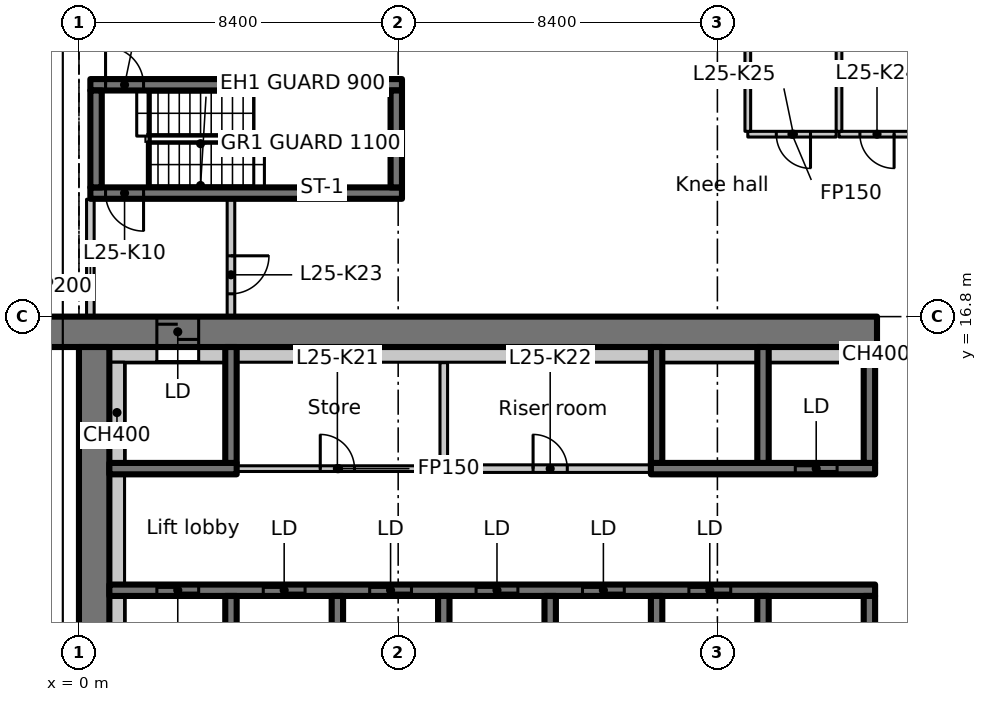
"""IFC4 building model, lengths in metres.
Left out: names, types, materials, properties, quantities, classifications, styles, units other than length and angle.
Written with IfcOpenShell. Run it as: python <this file> out.ifc"""

import sys

from ifc_helpers import new_model, si_unit, direction, frame, frame_2d, origin, place, context, subcontext, project, spatial, rectangle, extrude, element, fill, save


model = new_model("IFC4")
c1 = context("Model", 3, precision=1e-05, world=origin(), true_north=direction((0.0, 1.0)))
c2 = subcontext(c1, "Body", "Model", "MODEL_VIEW")
j1 = project(units=[si_unit("LENGTHUNIT", "METRE"), si_unit("PLANEANGLEUNIT", "RADIAN")], contexts=[c1])
p1 = place(None, origin())
s1 = spatial("IfcSite", under=j1, at=p1, CompositionType="ELEMENT")
p2 = place(p1, origin())
s2 = spatial("IfcBuilding", under=s1, at=p2, CompositionType="ELEMENT")
p3 = place(p2, frame((0.0, 0.0, 106.1)))
s3 = spatial("IfcBuildingStorey", under=s2, at=p3, CompositionType="ELEMENT", Elevation=106.1)
p4 = place(p3, frame((-1.1, 16.4, 0.0), z_axis=(0.0, 0.0, 1.0), x_axis=(1.0, 0.0, 0.0)))
e1 = element("IfcWall", 1, at=p4, inside=s3, PredefinedType="SHEAR", context=c2, shape_type="SweptSolid", body=[
    extrude(rectangle(XDim=22.1, YDim=0.8, at=frame_2d((11.05, 0.0))), origin(), (0.0, 0.0, 1.0), 3.35),
])
p5 = place(p4, frame((3.15, 0.0, 0.0)))
e2 = element("IfcOpeningElement", 2, at=p5, cuts=e1, PredefinedType="OPENING", context=c2, shape_type="SweptSolid", body=[
    extrude(rectangle(XDim=1.1, YDim=2.3, at=frame_2d((0.55, 1.15))), frame((0.0, 0.41, 0.0), z_axis=(0.0, -1.0, 0.0), x_axis=(1.0, 0.0, 0.0)), (0.0, 0.0, 1.0), 0.82),
])
p6 = place(p3, frame((0.4, 7.136, 0.0), z_axis=(0.0, 0.0, 1.0), x_axis=(0.0, 1.0, 0.0)))
e3 = element("IfcWall", 3, at=p6, inside=s3, PredefinedType="SHEAR", context=c2, shape_type="SweptSolid", body=[
    extrude(rectangle(XDim=8.864, YDim=0.8, at=frame_2d((4.432, 0.0))), origin(), (0.0, 0.0, 1.0), 3.35),
])
p7 = place(p3, frame((0.8, 15.8, 0.0), z_axis=(0.0, 0.0, 1.0), x_axis=(1.0, 0.0, 0.0)))
e4 = element("IfcWall", 4, at=p7, inside=s3, PredefinedType="PARTITIONING", context=c2, shape_type="SweptSolid", body=[
    extrude(rectangle(XDim=1.25, YDim=0.4, at=frame_2d((0.625, 0.0))), origin(), (0.0, 0.0, 1.0), 3.35),
])
p8 = place(p3, frame((0.8, 9.6, 0.0), z_axis=(0.0, 0.0, 1.0), x_axis=(1.0, 0.0, 0.0)))
e5 = element("IfcWall", 5, at=p8, inside=s3, PredefinedType="SHEAR", context=c2, shape_type="SweptSolid", body=[
    extrude(rectangle(XDim=20.15, YDim=0.3, at=frame_2d((10.075, 0.0))), origin(), (0.0, 0.0, 1.0), 3.35),
])
p9 = place(p8, frame((1.25, 0.0, 0.0)))
e6 = element("IfcOpeningElement", 6, at=p9, cuts=e5, PredefinedType="OPENING", context=c2, shape_type="SweptSolid", body=[
    extrude(rectangle(XDim=1.1, YDim=2.3, at=frame_2d((0.55, 1.15))), frame((0.0, 0.16, 0.0), z_axis=(0.0, -1.0, 0.0), x_axis=(1.0, 0.0, 0.0)), (0.0, 0.0, 1.0), 0.32),
])
p10 = place(p8, frame((4.05, 0.0, 0.0)))
e7 = element("IfcOpeningElement", 7, at=p10, cuts=e5, PredefinedType="OPENING", context=c2, shape_type="SweptSolid", body=[
    extrude(rectangle(XDim=1.1, YDim=2.3, at=frame_2d((0.55, 1.15))), frame((0.0, 0.16, 0.0), z_axis=(0.0, -1.0, 0.0), x_axis=(1.0, 0.0, 0.0)), (0.0, 0.0, 1.0), 0.32),
])
p11 = place(p8, frame((6.85, 0.0, 0.0)))
e8 = element("IfcOpeningElement", 8, at=p11, cuts=e5, PredefinedType="OPENING", context=c2, shape_type="SweptSolid", body=[
    extrude(rectangle(XDim=1.1, YDim=2.3, at=frame_2d((0.55, 1.15))), frame((0.0, 0.16, 0.0), z_axis=(0.0, -1.0, 0.0), x_axis=(1.0, 0.0, 0.0)), (0.0, 0.0, 1.0), 0.32),
])
p12 = place(p8, frame((9.65, 0.0, 0.0)))
e9 = element("IfcOpeningElement", 9, at=p12, cuts=e5, PredefinedType="OPENING", context=c2, shape_type="SweptSolid", body=[
    extrude(rectangle(XDim=1.1, YDim=2.3, at=frame_2d((0.55, 1.15))), frame((0.0, 0.16, 0.0), z_axis=(0.0, -1.0, 0.0), x_axis=(1.0, 0.0, 0.0)), (0.0, 0.0, 1.0), 0.32),
])
p13 = place(p8, frame((12.45, 0.0, 0.0)))
e10 = element("IfcOpeningElement", 10, at=p13, cuts=e5, PredefinedType="OPENING", context=c2, shape_type="SweptSolid", body=[
    extrude(rectangle(XDim=1.1, YDim=2.3, at=frame_2d((0.55, 1.15))), frame((0.0, 0.16, 0.0), z_axis=(0.0, -1.0, 0.0), x_axis=(1.0, 0.0, 0.0)), (0.0, 0.0, 1.0), 0.32),
])
p14 = place(p8, frame((15.25, 0.0, 0.0)))
e11 = element("IfcOpeningElement", 11, at=p14, cuts=e5, PredefinedType="OPENING", context=c2, shape_type="SweptSolid", body=[
    extrude(rectangle(XDim=1.1, YDim=2.3, at=frame_2d((0.55, 1.15))), frame((0.0, 0.16, 0.0), z_axis=(0.0, -1.0, 0.0), x_axis=(1.0, 0.0, 0.0)), (0.0, 0.0, 1.0), 0.32),
])
for number, where, z_axis, x_axis in (
    (12, (4.0, 7.15, 0.0), (0.0, 0.0, 1.0), (0.0, 1.0, 0.0)),
    (13, (6.8, 7.15, 0.0), (0.0, 0.0, 1.0), (0.0, 1.0, 0.0)),
    (14, (9.6, 7.15, 0.0), (0.0, 0.0, 1.0), (0.0, 1.0, 0.0)),
    (15, (12.4, 7.15, 0.0), (0.0, 0.0, 1.0), (0.0, 1.0, 0.0)),
    (16, (15.2, 7.15, 0.0), (0.0, 0.0, 1.0), (0.0, 1.0, 0.0)),
    (17, (18.0, 7.15, 0.0), (0.0, 0.0, 1.0), (0.0, 1.0, 0.0)),
    (18, (20.8, 7.15, 0.0), (0.0, 0.0, 1.0), (0.0, 1.0, 0.0)),
):
    element("IfcWall", number, at=place(p3, frame(where, z_axis=z_axis, x_axis=x_axis)), inside=s3, PredefinedType="SHEAR", context=c2, shape_type="SweptSolid", body=[
        extrude(rectangle(XDim=2.3, YDim=0.3, at=frame_2d((1.15, 0.0))), origin(), (0.0, 0.0, 1.0), 3.35),
    ])
p15 = place(p3, frame((0.8, 12.8, 0.0), z_axis=(0.0, 0.0, 1.0), x_axis=(1.0, 0.0, 0.0)))
e19 = element("IfcWall", 19, at=p15, inside=s3, PredefinedType="SHEAR", context=c2, shape_type="SweptSolid", body=[
    extrude(rectangle(XDim=3.35, YDim=0.3, at=frame_2d((1.675, 0.0))), origin(), (0.0, 0.0, 1.0), 3.35),
])
p16 = place(p3, frame((4.0, 12.95, 0.0), z_axis=(0.0, 0.0, 1.0), x_axis=(0.0, 1.0, 0.0)))
e20 = element("IfcWall", 20, at=p16, inside=s3, PredefinedType="SHEAR", context=c2, shape_type="SweptSolid", body=[
    extrude(rectangle(XDim=3.05, YDim=0.3, at=frame_2d((1.525, 0.0))), origin(), (0.0, 0.0, 1.0), 3.35),
])
p17 = place(p3, frame((15.05, 12.8, 0.0), z_axis=(0.0, 0.0, 1.0), x_axis=(1.0, 0.0, 0.0)))
e21 = element("IfcWall", 21, at=p17, inside=s3, PredefinedType="SHEAR", context=c2, shape_type="SweptSolid", body=[
    extrude(rectangle(XDim=5.9, YDim=0.3, at=frame_2d((2.95, 0.0))), origin(), (0.0, 0.0, 1.0), 3.35),
])
p18 = place(p17, frame((3.8, 0.0, 0.0)))
e22 = element("IfcOpeningElement", 22, at=p18, cuts=e21, PredefinedType="OPENING", context=c2, shape_type="SweptSolid", body=[
    extrude(rectangle(XDim=1.1, YDim=2.3, at=frame_2d((0.55, 1.15))), frame((0.0, 0.16, 0.0), z_axis=(0.0, -1.0, 0.0), x_axis=(1.0, 0.0, 0.0)), (0.0, 0.0, 1.0), 0.32),
])
for number, where, z_axis, x_axis in (
    (23, (15.2, 12.95, 0.0), (0.0, 0.0, 1.0), (0.0, 1.0, 0.0)),
    (24, (18.0, 12.95, 0.0), (0.0, 0.0, 1.0), (0.0, 1.0, 0.0)),
    (25, (20.8, 12.95, 0.0), (0.0, 0.0, 1.0), (0.0, 1.0, 0.0)),
):
    element("IfcWall", number, at=place(p3, frame(where, z_axis=z_axis, x_axis=x_axis)), inside=s3, PredefinedType="SHEAR", context=c2, shape_type="SweptSolid", body=[
        extrude(rectangle(XDim=3.05, YDim=0.3, at=frame_2d((1.525, 0.0))), origin(), (0.0, 0.0, 1.0), 3.35),
    ])
p19 = place(p3, frame((8.5, 20.05, 0.0), z_axis=(0.0, 0.0, 1.0), x_axis=(-1.0, 0.0, 0.0)))
e26 = element("IfcWall", 26, at=p19, inside=s3, PredefinedType="SHEAR", context=c2, shape_type="SweptSolid", body=[
    extrude(rectangle(XDim=8.2, YDim=0.3, at=frame_2d((4.1, 0.0))), origin(), (0.0, 0.0, 1.0), 3.35),
])
p20 = place(p19, frame((6.8, 0.0, 0.0)))
e27 = element("IfcOpeningElement", 27, at=p20, cuts=e26, PredefinedType="OPENING", context=c2, shape_type="SweptSolid", body=[
    extrude(rectangle(XDim=1.0, YDim=2.1, at=frame_2d((0.5, 1.05))), frame((0.0, 0.16, 0.0), z_axis=(0.0, -1.0, 0.0), x_axis=(1.0, 0.0, 0.0)), (0.0, 0.0, 1.0), 0.32),
])
p21 = place(p3, frame((0.3, 22.9, 0.0), z_axis=(0.0, 0.0, 1.0), x_axis=(1.0, 0.0, 0.0)))
e28 = element("IfcWall", 28, at=p21, inside=s3, PredefinedType="SHEAR", context=c2, shape_type="SweptSolid", body=[
    extrude(rectangle(XDim=8.2, YDim=0.3, at=frame_2d((4.1, 0.0))), origin(), (0.0, 0.0, 1.0), 3.35),
])
p22 = place(p21, frame((0.4, 0.0, 0.0)))
e29 = element("IfcOpeningElement", 29, at=p22, cuts=e28, PredefinedType="OPENING", context=c2, shape_type="SweptSolid", body=[
    extrude(rectangle(XDim=1.0, YDim=2.1, at=frame_2d((0.5, 1.05))), frame((0.0, 0.16, 0.0), z_axis=(0.0, -1.0, 0.0), x_axis=(1.0, 0.0, 0.0)), (0.0, 0.0, 1.0), 0.32),
])
for number, where, z_axis, x_axis in (
    (30, (0.45, 20.2, 0.0), (0.0, 0.0, 1.0), (0.0, 1.0, 0.0)),
    (31, (8.35, 20.2, 0.0), (0.0, 0.0, 1.0), (0.0, 1.0, 0.0)),
):
    element("IfcWall", number, at=place(p3, frame(where, z_axis=z_axis, x_axis=x_axis)), inside=s3, PredefinedType="SHEAR", context=c2, shape_type="SweptSolid", body=[
        extrude(rectangle(XDim=2.55, YDim=0.3, at=frame_2d((1.275, 0.0))), origin(), (0.0, 0.0, 1.0), 3.35),
    ])
p23 = place(p3, frame((0.3, 16.812, 0.0), z_axis=(0.0, 0.0, 1.0), x_axis=(0.0, 1.0, 0.0)))
e32 = element("IfcWall", 32, at=p23, inside=s3, PredefinedType="PARTITIONING", context=c2, shape_type="SweptSolid", body=[
    extrude(rectangle(XDim=3.076, YDim=0.2, at=frame_2d((1.538, 0.0))), origin(), (0.0, 0.0, 1.0), 2.98),
])
p24 = place(p3, frame((4.0, 19.888, 0.0), z_axis=(0.0, 0.0, 1.0), x_axis=(0.0, -1.0, 0.0)))
e33 = element("IfcWall", 33, at=p24, inside=s3, PredefinedType="PARTITIONING", context=c2, shape_type="SweptSolid", body=[
    extrude(rectangle(XDim=3.076, YDim=0.2, at=frame_2d((1.538, 0.0))), origin(), (0.0, 0.0, 1.0), 3.35),
])
p25 = place(p24, frame((1.488, 0.0, 0.0)))
e34 = element("IfcOpeningElement", 34, at=p25, cuts=e33, PredefinedType="OPENING", context=c2, shape_type="SweptSolid", body=[
    extrude(rectangle(XDim=1.0, YDim=2.1, at=frame_2d((0.5, 1.05))), frame((0.0, 0.11, 0.0), z_axis=(0.0, -1.0, 0.0), x_axis=(1.0, 0.0, 0.0)), (0.0, 0.0, 1.0), 0.22),
])
p26 = place(p3, frame((9.6, 15.588, 0.0), z_axis=(0.0, 0.0, 1.0), x_axis=(0.0, -1.0, 0.0)))
e35 = element("IfcWall", 35, at=p26, inside=s3, PredefinedType="PARTITIONING", context=c2, shape_type="SweptSolid", body=[
    extrude(rectangle(XDim=2.788, YDim=0.2, at=frame_2d((1.394, 0.0))), origin(), (0.0, 0.0, 1.0), 3.35),
])
p27 = place(p3, frame((9.7, 12.8, 0.0), z_axis=(0.0, 0.0, 1.0), x_axis=(1.0, 0.0, 0.0)))
e36 = element("IfcWall", 36, at=p27, inside=s3, PredefinedType="PARTITIONING", context=c2, shape_type="SweptSolid", body=[
    extrude(rectangle(XDim=5.338, YDim=0.2, at=frame_2d((2.669, 0.0))), origin(), (0.0, 0.0, 1.0), 3.35),
])
p28 = place(p27, frame((2.25, 0.0, 0.0)))
e37 = element("IfcOpeningElement", 37, at=p28, cuts=e36, PredefinedType="OPENING", context=c2, shape_type="SweptSolid", body=[
    extrude(rectangle(XDim=0.9, YDim=2.1, at=frame_2d((0.45, 1.05))), frame((0.0, 0.11, 0.0), z_axis=(0.0, -1.0, 0.0), x_axis=(1.0, 0.0, 0.0)), (0.0, 0.0, 1.0), 0.22),
])
p29 = place(p3, frame((4.162, 12.8, 0.0), z_axis=(0.0, 0.0, 1.0), x_axis=(1.0, 0.0, 0.0)))
e38 = element("IfcWall", 38, at=p29, inside=s3, PredefinedType="PARTITIONING", context=c2, shape_type="SweptSolid", body=[
    extrude(rectangle(XDim=5.338, YDim=0.15, at=frame_2d((2.669, 0.0))), origin(), (0.0, 0.0, 1.0), 3.35),
])
p30 = place(p29, frame((2.188, 0.0, 0.0)))
e39 = element("IfcOpeningElement", 39, at=p30, cuts=e38, PredefinedType="OPENING", context=c2, shape_type="SweptSolid", body=[
    extrude(rectangle(XDim=0.9, YDim=2.1, at=frame_2d((0.45, 1.05))), frame((0.0, 0.085, 0.0), z_axis=(0.0, -1.0, 0.0), x_axis=(1.0, 0.0, 0.0)), (0.0, 0.0, 1.0), 0.17),
])
p31 = place(p3, frame((21.925, 21.6, 0.0), z_axis=(0.0, 0.0, 1.0), x_axis=(-1.0, 0.0, 0.0)))
e40 = element("IfcWall", 40, at=p31, inside=s3, PredefinedType="PARTITIONING", context=c2, shape_type="SweptSolid", body=[
    extrude(rectangle(XDim=1.925, YDim=0.15, at=frame_2d((0.962, 0.0))), origin(), (0.0, 0.0, 1.0), 3.35),
])
p32 = place(p31, frame((0.475, 0.0, 0.0)))
e41 = element("IfcOpeningElement", 41, at=p32, cuts=e40, PredefinedType="OPENING", context=c2, shape_type="SweptSolid", body=[
    extrude(rectangle(XDim=0.9, YDim=2.1, at=frame_2d((0.45, 1.05))), frame((0.0, 0.085, 0.0), z_axis=(0.0, -1.0, 0.0), x_axis=(1.0, 0.0, 0.0)), (0.0, 0.0, 1.0), 0.17),
])
p33 = place(p3, frame((20.0, 21.675, 0.0), z_axis=(0.0, 0.0, 1.0), x_axis=(0.0, 1.0, 0.0)))
e42 = element("IfcWall", 42, at=p33, inside=s3, PredefinedType="PARTITIONING", context=c2, shape_type="SweptSolid", body=[
    extrude(rectangle(XDim=2.25, YDim=0.15, at=frame_2d((1.125, 0.0))), origin(), (0.0, 0.0, 1.0), 3.35),
])
p34 = place(p3, frame((19.925, 21.6, 0.0), z_axis=(0.0, 0.0, 1.0), x_axis=(-1.0, 0.0, 0.0)))
e43 = element("IfcWall", 43, at=p34, inside=s3, PredefinedType="PARTITIONING", context=c2, shape_type="SweptSolid", body=[
    extrude(rectangle(XDim=2.325, YDim=0.15, at=frame_2d((1.163, 0.0))), origin(), (0.0, 0.0, 1.0), 3.35),
])
p35 = place(p34, frame((0.675, 0.0, 0.0)))
e44 = element("IfcOpeningElement", 44, at=p35, cuts=e43, PredefinedType="OPENING", context=c2, shape_type="SweptSolid", body=[
    extrude(rectangle(XDim=0.9, YDim=2.1, at=frame_2d((0.45, 1.05))), frame((0.0, 0.085, 0.0), z_axis=(0.0, -1.0, 0.0), x_axis=(1.0, 0.0, 0.0)), (0.0, 0.0, 1.0), 0.17),
])
p36 = place(p3, frame((17.6, 21.675, 0.0), z_axis=(0.0, 0.0, 1.0), x_axis=(0.0, 1.0, 0.0)))
e45 = element("IfcWall", 45, at=p36, inside=s3, PredefinedType="PARTITIONING", context=c2, shape_type="SweptSolid", body=[
    extrude(rectangle(XDim=2.325, YDim=0.15, at=frame_2d((1.163, 0.0))), origin(), (0.0, 0.0, 1.0), 3.35),
])
p37 = place(p3, frame((1.0, 7.15, 0.0), z_axis=(0.0, 0.0, 1.0), x_axis=(0.0, 1.0, 0.0)))
e46 = element("IfcWall", 46, at=p37, inside=s3, PredefinedType="PARTITIONING", context=c2, shape_type="SweptSolid", body=[
    extrude(rectangle(XDim=2.3, YDim=0.4, at=frame_2d((1.15, 0.0))), origin(), (0.0, 0.0, 1.0), 3.35),
])
p38 = place(p3, frame((1.0, 9.75, 0.0), z_axis=(0.0, 0.0, 1.0), x_axis=(0.0, 1.0, 0.0)))
e47 = element("IfcWall", 47, at=p38, inside=s3, PredefinedType="PARTITIONING", context=c2, shape_type="SweptSolid", body=[
    extrude(rectangle(XDim=2.9, YDim=0.4, at=frame_2d((1.45, 0.0))), origin(), (0.0, 0.0, 1.0), 3.35),
])
p39 = place(p3, frame((1.0, 12.95, 0.0), z_axis=(0.0, 0.0, 1.0), x_axis=(0.0, 1.0, 0.0)))
e48 = element("IfcWall", 48, at=p39, inside=s3, PredefinedType="PARTITIONING", context=c2, shape_type="SweptSolid", body=[
    extrude(rectangle(XDim=2.65, YDim=0.4, at=frame_2d((1.325, 0.0))), origin(), (0.0, 0.0, 1.0), 3.35),
])
p40 = place(p3, frame((3.15, 15.8, 0.0), z_axis=(0.0, 0.0, 1.0), x_axis=(1.0, 0.0, 0.0)))
e49 = element("IfcWall", 49, at=p40, inside=s3, PredefinedType="PARTITIONING", context=c2, shape_type="SweptSolid", body=[
    extrude(rectangle(XDim=0.7, YDim=0.4, at=frame_2d((0.35, 0.0))), origin(), (0.0, 0.0, 1.0), 3.35),
])
p41 = place(p3, frame((4.15, 15.8, 0.0), z_axis=(0.0, 0.0, 1.0), x_axis=(1.0, 0.0, 0.0)))
e50 = element("IfcWall", 50, at=p41, inside=s3, PredefinedType="PARTITIONING", context=c2, shape_type="SweptSolid", body=[
    extrude(rectangle(XDim=10.9, YDim=0.4, at=frame_2d((5.45, 0.0))), origin(), (0.0, 0.0, 1.0), 3.35),
])
for number, where, z_axis, x_axis in (
    (51, (15.35, 15.8, 0.0), (0.0, 0.0, 1.0), (1.0, 0.0, 0.0)),
    (52, (18.15, 15.8, 0.0), (0.0, 0.0, 1.0), (1.0, 0.0, 0.0)),
):
    element("IfcWall", number, at=place(p3, frame(where, z_axis=z_axis, x_axis=x_axis)), inside=s3, PredefinedType="PARTITIONING", context=c2, shape_type="SweptSolid", body=[
        extrude(rectangle(XDim=2.5, YDim=0.4, at=frame_2d((1.25, 0.0))), origin(), (0.0, 0.0, 1.0), 3.35),
    ])
p42 = place(p3, frame((20.95, 15.8, 0.0), z_axis=(0.0, 0.0, 1.0), x_axis=(1.0, 0.0, 0.0)))
e53 = element("IfcWall", 53, at=p42, inside=s3, PredefinedType="PARTITIONING", context=c2, shape_type="SweptSolid", body=[
    extrude(rectangle(XDim=0.05, YDim=0.4, at=frame_2d((0.025, 0.0))), origin(), (0.0, 0.0, 1.0), 3.35),
])
p43 = place(p9, origin())
e54 = element("IfcDoor", 54, at=p43, inside=s3, OperationType="SLIDING_TO_LEFT", PredefinedType="DOOR", context=c2, shape_type="SweptSolid", body=[
    extrude(rectangle(XDim=1.1, YDim=2.3, at=frame_2d((0.55, 1.15))), frame((0.0, 0.025, 0.0), z_axis=(0.0, -1.0, 0.0), x_axis=(1.0, 0.0, 0.0)), (0.0, 0.0, 1.0), 0.05),
])
fill(e6, e54)
p44 = place(p10, origin())
e55 = element("IfcDoor", 55, at=p44, inside=s3, OperationType="SLIDING_TO_LEFT", PredefinedType="DOOR", context=c2, shape_type="SweptSolid", body=[
    extrude(rectangle(XDim=1.1, YDim=2.3, at=frame_2d((0.55, 1.15))), frame((0.0, 0.025, 0.0), z_axis=(0.0, -1.0, 0.0), x_axis=(1.0, 0.0, 0.0)), (0.0, 0.0, 1.0), 0.05),
])
fill(e7, e55)
p45 = place(p11, origin())
e56 = element("IfcDoor", 56, at=p45, inside=s3, OperationType="SLIDING_TO_LEFT", PredefinedType="DOOR", context=c2, shape_type="SweptSolid", body=[
    extrude(rectangle(XDim=1.1, YDim=2.3, at=frame_2d((0.55, 1.15))), frame((0.0, 0.025, 0.0), z_axis=(0.0, -1.0, 0.0), x_axis=(1.0, 0.0, 0.0)), (0.0, 0.0, 1.0), 0.05),
])
fill(e8, e56)
p46 = place(p12, origin())
e57 = element("IfcDoor", 57, at=p46, inside=s3, OperationType="SLIDING_TO_LEFT", PredefinedType="DOOR", context=c2, shape_type="SweptSolid", body=[
    extrude(rectangle(XDim=1.1, YDim=2.3, at=frame_2d((0.55, 1.15))), frame((0.0, 0.025, 0.0), z_axis=(0.0, -1.0, 0.0), x_axis=(1.0, 0.0, 0.0)), (0.0, 0.0, 1.0), 0.05),
])
fill(e9, e57)
p47 = place(p13, origin())
e58 = element("IfcDoor", 58, at=p47, inside=s3, OperationType="SLIDING_TO_LEFT", PredefinedType="DOOR", context=c2, shape_type="SweptSolid", body=[
    extrude(rectangle(XDim=1.1, YDim=2.3, at=frame_2d((0.55, 1.15))), frame((0.0, 0.025, 0.0), z_axis=(0.0, -1.0, 0.0), x_axis=(1.0, 0.0, 0.0)), (0.0, 0.0, 1.0), 0.05),
])
fill(e10, e58)
p48 = place(p14, origin())
e59 = element("IfcDoor", 59, at=p48, inside=s3, OperationType="SLIDING_TO_LEFT", PredefinedType="DOOR", context=c2, shape_type="SweptSolid", body=[
    extrude(rectangle(XDim=1.1, YDim=2.3, at=frame_2d((0.55, 1.15))), frame((0.0, 0.025, 0.0), z_axis=(0.0, -1.0, 0.0), x_axis=(1.0, 0.0, 0.0)), (0.0, 0.0, 1.0), 0.05),
])
fill(e11, e59)
p49 = place(p5, origin())
e60 = element("IfcDoor", 60, at=p49, inside=s3, OperationType="SLIDING_TO_LEFT", PredefinedType="DOOR", context=c2, shape_type="SweptSolid", body=[
    extrude(rectangle(XDim=1.1, YDim=2.3, at=frame_2d((0.55, 1.15))), frame((0.0, 0.025, 0.0), z_axis=(0.0, -1.0, 0.0), x_axis=(1.0, 0.0, 0.0)), (0.0, 0.0, 1.0), 0.05),
])
fill(e2, e60)
p50 = place(p18, origin())
e61 = element("IfcDoor", 61, at=p50, inside=s3, OperationType="SLIDING_TO_LEFT", PredefinedType="DOOR", context=c2, shape_type="SweptSolid", body=[
    extrude(rectangle(XDim=1.1, YDim=2.3, at=frame_2d((0.55, 1.15))), frame((0.0, 0.025, 0.0), z_axis=(0.0, -1.0, 0.0), x_axis=(1.0, 0.0, 0.0)), (0.0, 0.0, 1.0), 0.05),
])
fill(e22, e61)
p51 = place(p20, origin())
e62 = element("IfcDoor", 62, at=p51, inside=s3, OperationType="SINGLE_SWING_RIGHT", PredefinedType="DOOR", context=c2, shape_type="SweptSolid", body=[
    extrude(rectangle(XDim=1.0, YDim=2.1, at=frame_2d((0.5, 1.05))), frame((0.0, 0.025, 0.0), z_axis=(0.0, -1.0, 0.0), x_axis=(1.0, 0.0, 0.0)), (0.0, 0.0, 1.0), 0.05),
])
fill(e27, e62)
p52 = place(p22, origin())
e63 = element("IfcDoor", 63, at=p52, inside=s3, OperationType="SINGLE_SWING_LEFT", PredefinedType="DOOR", context=c2, shape_type="SweptSolid", body=[
    extrude(rectangle(XDim=1.0, YDim=2.1, at=frame_2d((0.5, 1.05))), frame((0.0, 0.025, 0.0), z_axis=(0.0, -1.0, 0.0), x_axis=(1.0, 0.0, 0.0)), (0.0, 0.0, 1.0), 0.05),
])
fill(e29, e63)
p53 = place(p30, origin())
e64 = element("IfcDoor", 64, at=p53, inside=s3, OperationType="SINGLE_SWING_LEFT", PredefinedType="DOOR", context=c2, shape_type="SweptSolid", body=[
    extrude(rectangle(XDim=0.9, YDim=2.1, at=frame_2d((0.45, 1.05))), frame((0.0, 0.025, 0.0), z_axis=(0.0, -1.0, 0.0), x_axis=(1.0, 0.0, 0.0)), (0.0, 0.0, 1.0), 0.05),
])
fill(e39, e64)
p54 = place(p28, origin())
e65 = element("IfcDoor", 65, at=p54, inside=s3, OperationType="SINGLE_SWING_RIGHT", PredefinedType="DOOR", context=c2, shape_type="SweptSolid", body=[
    extrude(rectangle(XDim=0.9, YDim=2.1, at=frame_2d((0.45, 1.05))), frame((0.0, 0.025, 0.0), z_axis=(0.0, -1.0, 0.0), x_axis=(1.0, 0.0, 0.0)), (0.0, 0.0, 1.0), 0.05),
])
fill(e37, e65)
p55 = place(p25, origin())
e66 = element("IfcDoor", 66, at=p55, inside=s3, OperationType="SINGLE_SWING_LEFT", PredefinedType="DOOR", context=c2, shape_type="SweptSolid", body=[
    extrude(rectangle(XDim=1.0, YDim=2.1, at=frame_2d((0.5, 1.05))), frame((0.0, 0.025, 0.0), z_axis=(0.0, -1.0, 0.0), x_axis=(1.0, 0.0, 0.0)), (0.0, 0.0, 1.0), 0.05),
])
fill(e34, e66)
p56 = place(p32, origin())
e67 = element("IfcDoor", 67, at=p56, inside=s3, OperationType="SINGLE_SWING_RIGHT", PredefinedType="DOOR", context=c2, shape_type="SweptSolid", body=[
    extrude(rectangle(XDim=0.9, YDim=2.1, at=frame_2d((0.45, 1.05))), frame((0.0, 0.025, 0.0), z_axis=(0.0, -1.0, 0.0), x_axis=(1.0, 0.0, 0.0)), (0.0, 0.0, 1.0), 0.05),
])
fill(e41, e67)
p57 = place(p35, origin())
e68 = element("IfcDoor", 68, at=p57, inside=s3, OperationType="SINGLE_SWING_LEFT", PredefinedType="DOOR", context=c2, shape_type="SweptSolid", body=[
    extrude(rectangle(XDim=0.9, YDim=2.1, at=frame_2d((0.45, 1.05))), frame((0.0, 0.025, 0.0), z_axis=(0.0, -1.0, 0.0), x_axis=(1.0, 0.0, 0.0)), (0.0, 0.0, 1.0), 0.05),
])
fill(e44, e68)
save(model, sys.argv[1])
